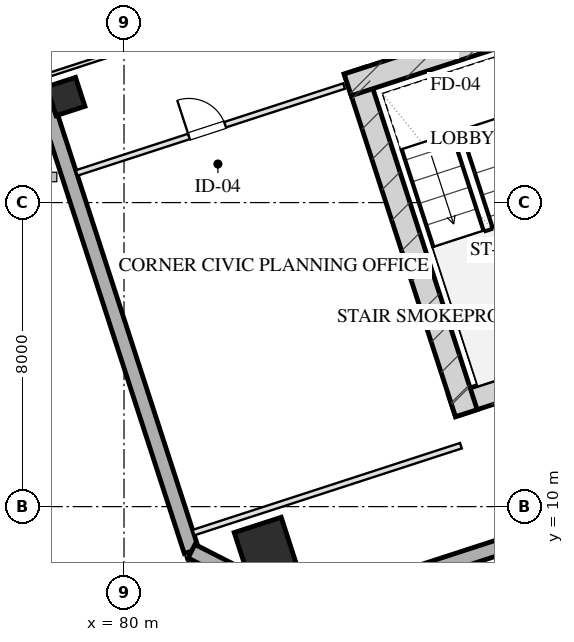
"""IFC4 building model, lengths in metres.
Left out: names, types, materials, properties, quantities, classifications, styles, units other than length and angle.
Written with IfcOpenShell. Run it as: python <this file> out.ifc"""

import sys

from ifc_helpers import new_model, si_unit, direction, frame, frame_2d, origin, origin_2d, place, context, subcontext, project, spatial, rectangle, hollow_rectangle, extrude, element, fill, save


model = new_model("IFC4")
c1 = context("Model", 3, precision=1e-05, world=origin(), true_north=direction((0.0, 1.0)))
c2 = subcontext(c1, "Body", "Model", "MODEL_VIEW")
j1 = project(units=[si_unit("LENGTHUNIT", "METRE"), si_unit("PLANEANGLEUNIT", "RADIAN")], contexts=[c1])
p1 = place(None, origin())
s1 = spatial("IfcSite", under=j1, at=p1, CompositionType="ELEMENT")
p2 = place(p1, origin())
s2 = spatial("IfcBuilding", under=s1, at=p2, CompositionType="ELEMENT")
p3 = place(p2, frame((0.0, 0.0, 142.6)))
s3 = spatial("IfcBuildingStorey", under=s2, at=p3, CompositionType="ELEMENT", Elevation=142.6)
p4 = place(p3, frame((88.63, 12.652, 0.0), z_axis=(0.0, 0.0, 1.0), x_axis=(0.95105714907, 0.309015046886, 0.0)))
e1 = element("IfcWall", 1, at=p4, inside=s3, PredefinedType="SHEAR", context=c2, shape_type="SweptSolid", body=[
    extrude(rectangle(XDim=16.4, YDim=0.6, at=frame_2d((8.2, 0.0))), origin(), (0.0, 0.0, 1.0), 3.45),
])
p5 = place(p3, frame((86.078, 21.475, 0.0), z_axis=(0.0, 0.0, 1.0), x_axis=(0.309017938678, -0.951056209472, 0.0)))
e2 = element("IfcWall", 2, at=p5, inside=s3, PredefinedType="SHEAR", context=c2, shape_type="SweptSolid", body=[
    extrude(rectangle(XDim=9.48, YDim=0.6, at=frame_2d((4.74, 0.0))), origin(), (0.0, 0.0, 1.0), 3.45),
])
p6 = place(p3, frame((85.886, 21.097, 0.0), z_axis=(0.0, 0.0, 1.0), x_axis=(0.951068073652, 0.308981422225, 0.0)))
e3 = element("IfcWall", 3, at=p6, inside=s3, PredefinedType="SHEAR", context=c2, shape_type="SweptSolid", body=[
    extrude(rectangle(XDim=4.22, YDim=0.6, at=frame_2d((2.11, 0.0))), origin(), (0.0, 0.0, 1.0), 3.45),
])
p7 = place(p3, frame((83.719, 8.901, 0.0), z_axis=(0.0, 0.0, 1.0), x_axis=(0.951056516295, 0.309016994375, 0.0)))
e4 = element("IfcColumn", 4, at=p7, inside=s3, PredefinedType="COLUMN", context=c2, shape_type="SweptSolid", body=[
    extrude(hollow_rectangle(XDim=1.3, YDim=1.3, WallThickness=0.045, at=origin_2d()), origin(), (0.0, 0.0, 1.0), 3.451),
])
p8 = place(p3, frame((78.468, 20.79, 0.0), z_axis=(0.0, 0.0, 1.0), x_axis=(0.951056516295, 0.309016994375, 0.0)))
e5 = element("IfcColumn", 5, at=p8, inside=s3, PredefinedType="COLUMN", context=c2, shape_type="SweptSolid", body=[
    extrude(hollow_rectangle(XDim=0.8, YDim=0.8, WallThickness=0.028, at=origin_2d()), origin(), (0.0, 0.0, 1.0), 3.451),
])
p9 = place(p3, frame((81.776, 8.827, 0.0), z_axis=(0.0, 0.0, 1.0), x_axis=(-0.309014228706, 0.951057414911, 0.0)))
e6 = element("IfcWall", 6, at=p9, inside=s3, PredefinedType="SOLIDWALL", context=c2, shape_type="SweptSolid", body=[
    extrude(rectangle(XDim=42.8, YDim=0.4, at=frame_2d((21.4, 0.0))), origin(), (0.0, 0.0, 1.0), 2.61),
])
p10 = place(p9, frame((23.95, 0.0, 0.0)))
e7 = element("IfcOpeningElement", 7, at=p10, cuts=e6, PredefinedType="OPENING", context=c2, shape_type="SweptSolid", body=[
    extrude(rectangle(XDim=1.1, YDim=2.15, at=frame_2d((0.55, 1.075))), frame((0.0, 0.21, 0.0), z_axis=(0.0, -1.0, 0.0), x_axis=(1.0, 0.0, 0.0)), (0.0, 0.0, 1.0), 0.42),
])
p11 = place(p3, frame((109.908, 15.444, 0.0), z_axis=(0.0, 0.0, 1.0), x_axis=(-0.951057580055, -0.30901372044, 0.0)))
e8 = element("IfcWall", 8, at=p11, inside=s3, PredefinedType="SOLIDWALL", context=c2, shape_type="SweptSolid", body=[
    extrude(rectangle(XDim=26.4, YDim=0.4, at=frame_2d((13.2, 0.0))), origin(), (0.0, 0.0, 1.0), 2.61),
])
p12 = place(p3, frame((84.801, 7.286, 0.0), z_axis=(0.0, 0.0, 1.0), x_axis=(-0.891020832027, 0.453962417932, 0.0)))
e9 = element("IfcWall", 9, at=p12, inside=s3, PredefinedType="SOLIDWALL", context=c2, shape_type="SweptSolid", body=[
    extrude(rectangle(XDim=3.394, YDim=0.4, at=frame_2d((1.697, 0.0))), origin(), (0.0, 0.0, 1.0), 2.61),
])
p13 = place(p3, frame((81.828, 9.316, 0.0), z_axis=(0.0, 0.0, 1.0), x_axis=(0.95105128112, 0.309033106124, 0.0)))
e10 = element("IfcWall", 10, at=p13, inside=s3, PredefinedType="PARTITIONING", context=c2, shape_type="SweptSolid", body=[
    extrude(rectangle(XDim=7.4, YDim=0.15, at=frame_2d((3.7, 0.0))), origin(), (0.0, 0.0, 1.0), 3.175),
])
p14 = place(p3, frame((78.753, 18.78, 0.0), z_axis=(0.0, 0.0, 1.0), x_axis=(0.951060977215, 0.309003264738, 0.0)))
e11 = element("IfcWall", 11, at=p14, inside=s3, PredefinedType="PARTITIONING", context=c2, shape_type="SweptSolid", body=[
    extrude(rectangle(XDim=7.4, YDim=0.15, at=frame_2d((3.7, 0.0))), origin(), (0.0, 0.0, 1.0), 3.175),
])
p15 = place(p14, frame((3.108, 0.0, 0.0)))
e12 = element("IfcOpeningElement", 12, at=p15, cuts=e11, PredefinedType="OPENING", context=c2, shape_type="SweptSolid", body=[
    extrude(rectangle(XDim=1.0, YDim=2.05, at=frame_2d((0.5, 1.025))), frame((0.0, 0.085, 0.0), z_axis=(0.0, -1.0, 0.0), x_axis=(1.0, 0.0, 0.0)), (0.0, 0.0, 1.0), 0.17),
])
p16 = place(p3, frame((77.925, 21.328, 0.0), z_axis=(0.0, 0.0, 1.0), x_axis=(0.951059431056, 0.309008023519, 0.0)))
e13 = element("IfcWall", 13, at=p16, inside=s3, PredefinedType="MOVABLE", context=c2, shape_type="SweptSolid", body=[
    extrude(rectangle(XDim=5.8, YDim=0.1, at=frame_2d((2.9, 0.0))), origin(), (0.0, 0.0, 1.0), 3.175),
])
p17 = place(p15, origin())
e14 = element("IfcDoor", 14, at=p17, inside=s3, OperationType="SINGLE_SWING_LEFT", PredefinedType="DOOR", context=c2, shape_type="SweptSolid", body=[
    extrude(rectangle(XDim=1.0, YDim=2.05, at=frame_2d((0.5, 1.025))), frame((0.0, 0.025, 0.0), z_axis=(0.0, -1.0, 0.0), x_axis=(1.0, 0.0, 0.0)), (0.0, 0.0, 1.0), 0.05),
])
fill(e12, e14)
save(model, sys.argv[1])
